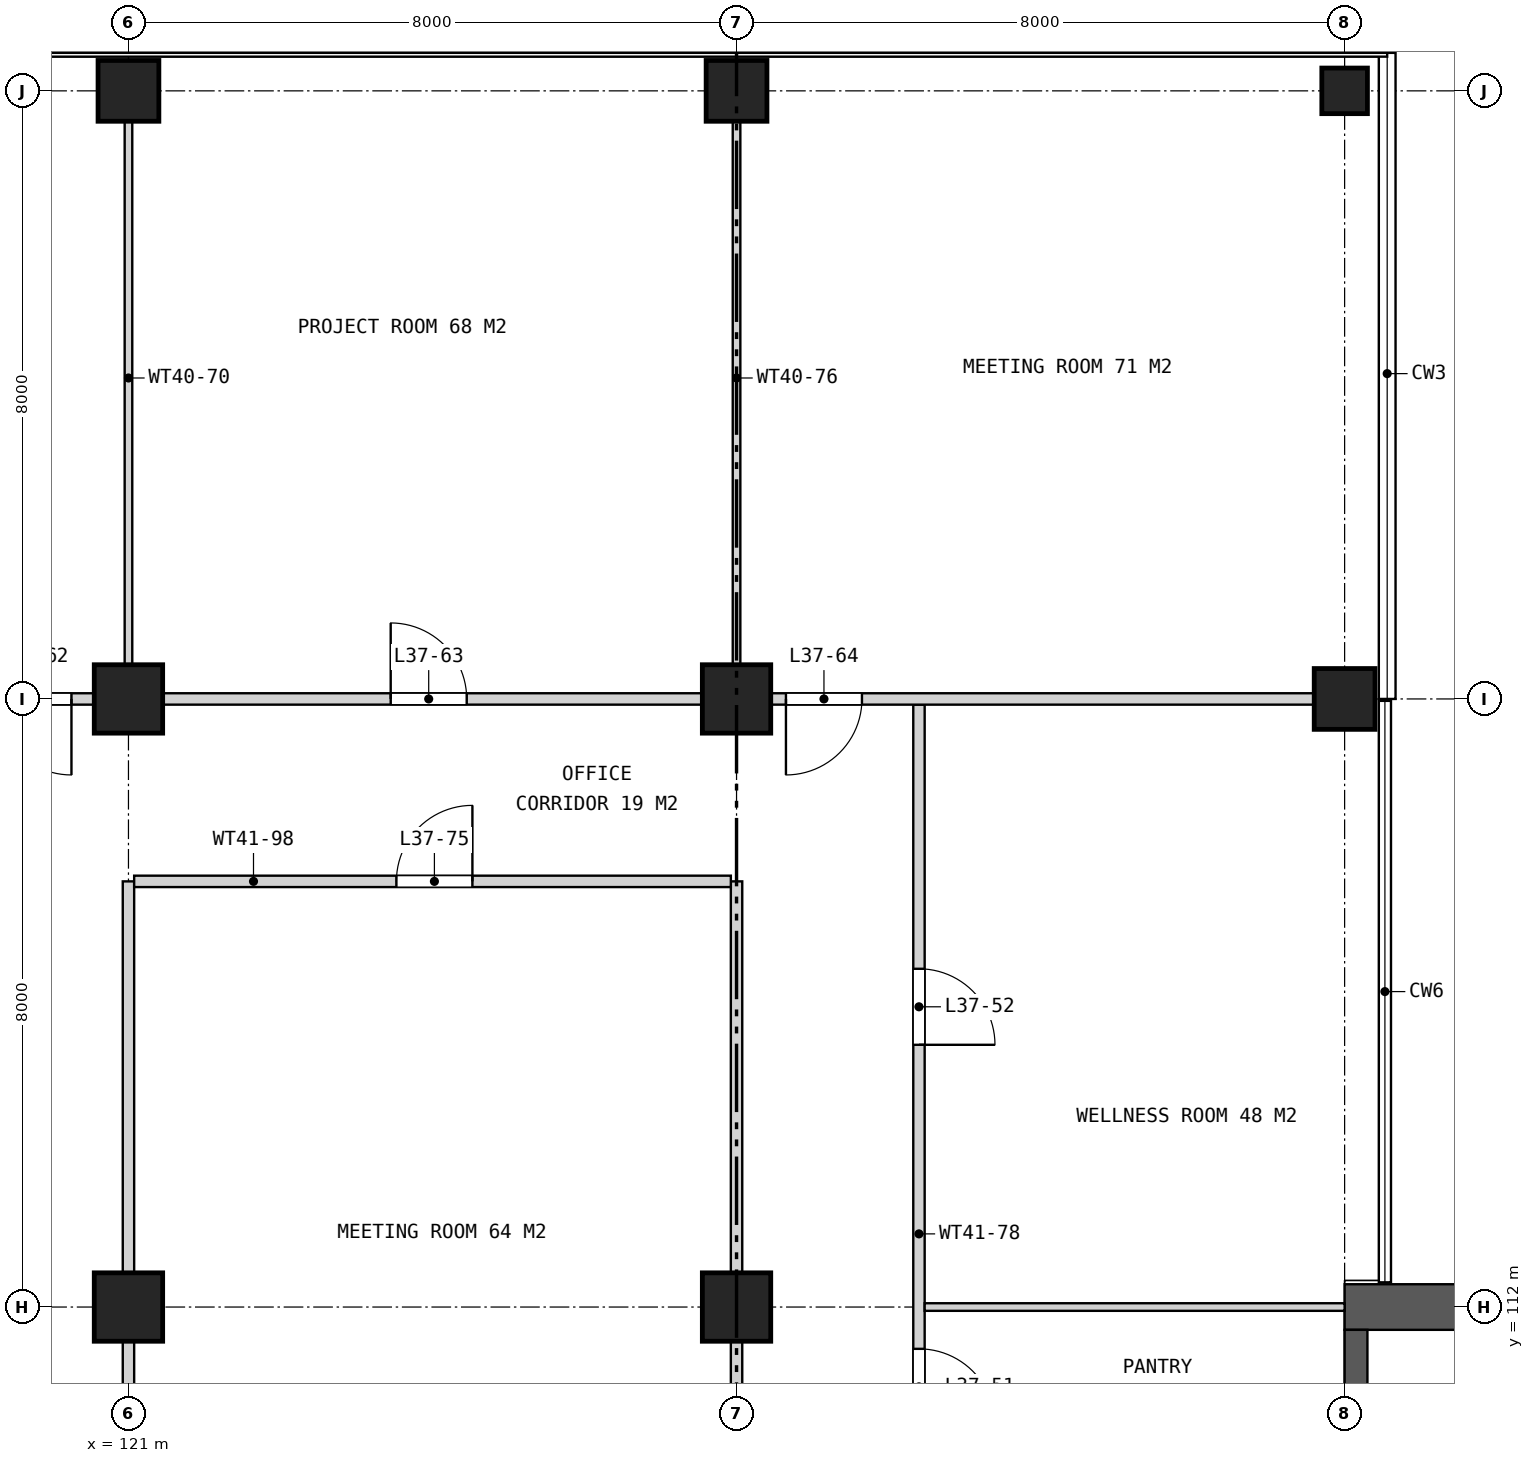
"""IFC4 building model, lengths in metres.
Left out: names, types, materials, properties, quantities, classifications, styles, units other than length and angle.
Written with IfcOpenShell. Run it as: python <this file> out.ifc"""

import sys

from ifc_helpers import new_model, si_unit, direction, frame, frame_2d, origin, origin_2d, place, context, subcontext, project, spatial, rectangle, extrude, element, fill, save


model = new_model("IFC4")
c1 = context("Model", 3, precision=1e-05, world=origin(), true_north=direction((0.0, 1.0)))
c2 = subcontext(c1, "Body", "Model", "MODEL_VIEW")
j1 = project(units=[si_unit("LENGTHUNIT", "METRE"), si_unit("PLANEANGLEUNIT", "RADIAN")], contexts=[c1])
p1 = place(None, origin())
s1 = spatial("IfcSite", under=j1, at=p1, CompositionType="ELEMENT")
p2 = place(p1, origin())
s2 = spatial("IfcBuilding", under=s1, at=p2, CompositionType="ELEMENT")
p3 = place(p2, frame((0.0, 0.0, 178.9)))
s3 = spatial("IfcBuildingStorey", under=s2, at=p3, CompositionType="ELEMENT", Elevation=178.9)
for number, where, z_axis, x_axis in (
    (1, (121.0, 112.0, 0.0), (0.0, 0.0, 1.0), (1.0, 0.0, 0.0)),
    (2, (121.0, 120.0, 0.0), (0.0, 0.0, 1.0), (1.0, 0.0, 0.0)),
):
    element("IfcColumn", number, at=place(p3, frame(where, z_axis=z_axis, x_axis=x_axis)), inside=s3, PredefinedType="COLUMN", context=c2, shape_type="SweptSolid", body=[
        extrude(rectangle(XDim=0.9, YDim=0.9, at=origin_2d()), origin(), (0.0, 0.0, 1.0), 4.2),
    ])
p4 = place(p3, frame((121.0, 128.0, 0.0), z_axis=(0.0, 0.0, 1.0), x_axis=(1.0, 0.0, 0.0)))
e3 = element("IfcColumn", 3, at=p4, inside=s3, PredefinedType="COLUMN", context=c2, shape_type="SweptSolid", body=[
    extrude(rectangle(XDim=0.8, YDim=0.8, at=origin_2d()), origin(), (0.0, 0.0, 1.0), 4.2),
])
for number, where, z_axis, x_axis in (
    (4, (129.0, 112.0, 0.0), (0.0, 0.0, 1.0), (1.0, 0.0, 0.0)),
    (5, (129.0, 120.0, 0.0), (0.0, 0.0, 1.0), (1.0, 0.0, 0.0)),
):
    element("IfcColumn", number, at=place(p3, frame(where, z_axis=z_axis, x_axis=x_axis)), inside=s3, PredefinedType="COLUMN", context=c2, shape_type="SweptSolid", body=[
        extrude(rectangle(XDim=0.9, YDim=0.9, at=origin_2d()), origin(), (0.0, 0.0, 1.0), 4.2),
    ])
for number, where, z_axis, x_axis in (
    (6, (129.0, 128.0, 0.0), (0.0, 0.0, 1.0), (1.0, 0.0, 0.0)),
    (7, (137.0, 120.0, 0.0), (0.0, 0.0, 1.0), (1.0, 0.0, 0.0)),
):
    element("IfcColumn", number, at=place(p3, frame(where, z_axis=z_axis, x_axis=x_axis)), inside=s3, PredefinedType="COLUMN", context=c2, shape_type="SweptSolid", body=[
        extrude(rectangle(XDim=0.8, YDim=0.8, at=origin_2d()), origin(), (0.0, 0.0, 1.0), 4.2),
    ])
p5 = place(p3, frame((137.0, 128.0, 0.0), z_axis=(0.0, 0.0, 1.0), x_axis=(1.0, 0.0, 0.0)))
e8 = element("IfcColumn", 8, at=p5, inside=s3, PredefinedType="COLUMN", context=c2, shape_type="SweptSolid", body=[
    extrude(rectangle(XDim=0.6, YDim=0.6, at=origin_2d()), origin(), (0.0, 0.0, 1.0), 4.2),
])
p6 = place(p3, frame((137.0, 112.0, 0.0), z_axis=(0.0, 0.0, 1.0), x_axis=(1.0, 0.0, 0.0)))
e9 = element("IfcWall", 9, at=p6, inside=s3, PredefinedType="SHEAR", context=c2, shape_type="SweptSolid", body=[
    extrude(rectangle(XDim=7.1, YDim=0.6, at=frame_2d((3.55, 0.0))), origin(), (0.0, 0.0, 1.0), 4.2),
])
p7 = place(p3, frame((137.15, 105.7, 0.0), z_axis=(0.0, 0.0, 1.0), x_axis=(0.0, 1.0, 0.0)))
e10 = element("IfcWall", 10, at=p7, inside=s3, PredefinedType="SHEAR", context=c2, shape_type="SweptSolid", body=[
    extrude(rectangle(XDim=6.0, YDim=0.3, at=frame_2d((3.0, 0.0))), origin(), (0.0, 0.0, 1.0), 4.2),
])
p8 = place(p3, frame((121.0, 82.4, 0.0), z_axis=(0.0, 0.0, 1.0), x_axis=(0.0, 1.0, 0.0)))
e11 = element("IfcWall", 11, at=p8, inside=s3, PredefinedType="PARTITIONING", context=c2, shape_type="SweptSolid", body=[
    extrude(rectangle(XDim=35.2, YDim=0.15, at=frame_2d((17.6, 0.0))), origin(), (0.0, 0.0, 1.0), 3.44),
])
p9 = place(p8, frame((8.25, 0.0, 0.0)))
e12 = element("IfcOpeningElement", 12, at=p9, cuts=e11, PredefinedType="OPENING", context=c2, shape_type="SweptSolid", body=[
    extrude(rectangle(XDim=1.0, YDim=2.1, at=frame_2d((0.5, 1.05))), frame((0.0, 0.085, 0.0), z_axis=(0.0, -1.0, 0.0), x_axis=(1.0, 0.0, 0.0)), (0.0, 0.0, 1.0), 0.17),
])
p10 = place(p8, frame((14.35, 0.0, 0.0)))
e13 = element("IfcOpeningElement", 13, at=p10, cuts=e11, PredefinedType="OPENING", context=c2, shape_type="SweptSolid", body=[
    extrude(rectangle(XDim=1.0, YDim=2.1, at=frame_2d((0.5, 1.05))), frame((0.0, 0.085, 0.0), z_axis=(0.0, -1.0, 0.0), x_axis=(1.0, 0.0, 0.0)), (0.0, 0.0, 1.0), 0.17),
])
p11 = place(p8, frame((18.75, 0.0, 0.0)))
e14 = element("IfcOpeningElement", 14, at=p11, cuts=e11, PredefinedType="OPENING", context=c2, shape_type="SweptSolid", body=[
    extrude(rectangle(XDim=1.0, YDim=2.1, at=frame_2d((0.5, 1.05))), frame((0.0, 0.085, 0.0), z_axis=(0.0, -1.0, 0.0), x_axis=(1.0, 0.0, 0.0)), (0.0, 0.0, 1.0), 0.17),
])
p12 = place(p8, frame((23.45, 0.0, 0.0)))
e15 = element("IfcOpeningElement", 15, at=p12, cuts=e11, PredefinedType="OPENING", context=c2, shape_type="SweptSolid", body=[
    extrude(rectangle(XDim=1.0, YDim=2.1, at=frame_2d((0.5, 1.05))), frame((0.0, 0.085, 0.0), z_axis=(0.0, -1.0, 0.0), x_axis=(1.0, 0.0, 0.0)), (0.0, 0.0, 1.0), 0.17),
])
p13 = place(p3, frame((121.0, 120.075, 0.0), z_axis=(0.0, 0.0, 1.0), x_axis=(0.0, 1.0, 0.0)))
e16 = element("IfcWall", 16, at=p13, inside=s3, PredefinedType="PARTITIONING", context=c2, shape_type="SweptSolid", body=[
    extrude(rectangle(XDim=8.295, YDim=0.1, at=frame_2d((4.147, 0.0))), origin(), (0.0, 0.0, 1.0), 3.44),
])
p14 = place(p3, frame((129.0, 82.4, 0.0), z_axis=(0.0, 0.0, 1.0), x_axis=(0.0, 1.0, 0.0)))
e17 = element("IfcWall", 17, at=p14, inside=s3, PredefinedType="PARTITIONING", context=c2, shape_type="SweptSolid", body=[
    extrude(rectangle(XDim=35.2, YDim=0.15, at=frame_2d((17.6, 0.0))), origin(), (0.0, 0.0, 1.0), 3.44),
])
p15 = place(p14, frame((14.35, 0.0, 0.0)))
e18 = element("IfcOpeningElement", 18, at=p15, cuts=e17, PredefinedType="OPENING", context=c2, shape_type="SweptSolid", body=[
    extrude(rectangle(XDim=1.0, YDim=2.1, at=frame_2d((0.5, 1.05))), frame((0.0, 0.085, 0.0), z_axis=(0.0, -1.0, 0.0), x_axis=(1.0, 0.0, 0.0)), (0.0, 0.0, 1.0), 0.17),
])
p16 = place(p14, frame((23.45, 0.0, 0.0)))
e19 = element("IfcOpeningElement", 19, at=p16, cuts=e17, PredefinedType="OPENING", context=c2, shape_type="SweptSolid", body=[
    extrude(rectangle(XDim=1.0, YDim=2.1, at=frame_2d((0.5, 1.05))), frame((0.0, 0.085, 0.0), z_axis=(0.0, -1.0, 0.0), x_axis=(1.0, 0.0, 0.0)), (0.0, 0.0, 1.0), 0.17),
])
p17 = place(p3, frame((129.0, 120.075, 0.0), z_axis=(0.0, 0.0, 1.0), x_axis=(0.0, 1.0, 0.0)))
e20 = element("IfcWall", 20, at=p17, inside=s3, PredefinedType="PARTITIONING", context=c2, shape_type="SweptSolid", body=[
    extrude(rectangle(XDim=8.295, YDim=0.1, at=frame_2d((4.147, 0.0))), origin(), (0.0, 0.0, 1.0), 3.44),
])
p18 = place(p3, frame((131.4, 106.0, 0.0), z_axis=(0.0, 0.0, 1.0), x_axis=(0.0, 1.0, 0.0)))
e21 = element("IfcWall", 21, at=p18, inside=s3, PredefinedType="PARTITIONING", context=c2, shape_type="SweptSolid", body=[
    extrude(rectangle(XDim=13.925, YDim=0.15, at=frame_2d((6.962, 0.0))), origin(), (0.0, 0.0, 1.0), 3.44),
])
p19 = place(p18, frame((1.45, 0.0, 0.0)))
e22 = element("IfcOpeningElement", 22, at=p19, cuts=e21, PredefinedType="OPENING", context=c2, shape_type="SweptSolid", body=[
    extrude(rectangle(XDim=1.0, YDim=2.1, at=frame_2d((0.5, 1.05))), frame((0.0, 0.085, 0.0), z_axis=(0.0, -1.0, 0.0), x_axis=(1.0, 0.0, 0.0)), (0.0, 0.0, 1.0), 0.17),
])
p20 = place(p18, frame((4.45, 0.0, 0.0)))
e23 = element("IfcOpeningElement", 23, at=p20, cuts=e21, PredefinedType="OPENING", context=c2, shape_type="SweptSolid", body=[
    extrude(rectangle(XDim=1.0, YDim=2.1, at=frame_2d((0.5, 1.05))), frame((0.0, 0.085, 0.0), z_axis=(0.0, -1.0, 0.0), x_axis=(1.0, 0.0, 0.0)), (0.0, 0.0, 1.0), 0.17),
])
p21 = place(p18, frame((9.45, 0.0, 0.0)))
e24 = element("IfcOpeningElement", 24, at=p21, cuts=e21, PredefinedType="OPENING", context=c2, shape_type="SweptSolid", body=[
    extrude(rectangle(XDim=1.0, YDim=2.1, at=frame_2d((0.5, 1.05))), frame((0.0, 0.085, 0.0), z_axis=(0.0, -1.0, 0.0), x_axis=(1.0, 0.0, 0.0)), (0.0, 0.0, 1.0), 0.17),
])
p22 = place(p3, frame((131.475, 112.0, 0.0), z_axis=(0.0, 0.0, 1.0), x_axis=(1.0, 0.0, 0.0)))
e25 = element("IfcWall", 25, at=p22, inside=s3, PredefinedType="PARTITIONING", context=c2, shape_type="SweptSolid", body=[
    extrude(rectangle(XDim=5.525, YDim=0.1, at=frame_2d((2.762, 0.0))), origin(), (0.0, 0.0, 1.0), 3.44),
])
p23 = place(p3, frame((121.075, 117.6, 0.0), z_axis=(0.0, 0.0, 1.0), x_axis=(1.0, 0.0, 0.0)))
e26 = element("IfcWall", 26, at=p23, inside=s3, PredefinedType="PARTITIONING", context=c2, shape_type="SweptSolid", body=[
    extrude(rectangle(XDim=7.85, YDim=0.15, at=frame_2d((3.925, 0.0))), origin(), (0.0, 0.0, 1.0), 3.44),
])
p24 = place(p23, frame((3.45, 0.0, 0.0)))
e27 = element("IfcOpeningElement", 27, at=p24, cuts=e26, PredefinedType="OPENING", context=c2, shape_type="SweptSolid", body=[
    extrude(rectangle(XDim=1.0, YDim=2.1, at=frame_2d((0.5, 1.05))), frame((0.0, 0.085, 0.0), z_axis=(0.0, -1.0, 0.0), x_axis=(1.0, 0.0, 0.0)), (0.0, 0.0, 1.0), 0.17),
])
p25 = place(p3, frame((112.63, 120.0, 0.0), z_axis=(0.0, 0.0, 1.0), x_axis=(1.0, 0.0, 0.0)))
e28 = element("IfcWall", 28, at=p25, inside=s3, PredefinedType="PARTITIONING", context=c2, shape_type="SweptSolid", body=[
    extrude(rectangle(XDim=24.74, YDim=0.15, at=frame_2d((12.37, 0.0))), origin(), (0.0, 0.0, 1.0), 3.44),
])
p26 = place(p25, frame((6.62, 0.0, 0.0)))
e29 = element("IfcOpeningElement", 29, at=p26, cuts=e28, PredefinedType="OPENING", context=c2, shape_type="SweptSolid", body=[
    extrude(rectangle(XDim=1.0, YDim=2.1, at=frame_2d((0.5, 1.05))), frame((0.0, 0.085, 0.0), z_axis=(0.0, -1.0, 0.0), x_axis=(1.0, 0.0, 0.0)), (0.0, 0.0, 1.0), 0.17),
])
p27 = place(p25, frame((11.82, 0.0, 0.0)))
e30 = element("IfcOpeningElement", 30, at=p27, cuts=e28, PredefinedType="OPENING", context=c2, shape_type="SweptSolid", body=[
    extrude(rectangle(XDim=1.0, YDim=2.1, at=frame_2d((0.5, 1.05))), frame((0.0, 0.085, 0.0), z_axis=(0.0, -1.0, 0.0), x_axis=(1.0, 0.0, 0.0)), (0.0, 0.0, 1.0), 0.17),
])
p28 = place(p25, frame((17.02, 0.0, 0.0)))
e31 = element("IfcOpeningElement", 31, at=p28, cuts=e28, PredefinedType="OPENING", context=c2, shape_type="SweptSolid", body=[
    extrude(rectangle(XDim=1.0, YDim=2.1, at=frame_2d((0.5, 1.05))), frame((0.0, 0.085, 0.0), z_axis=(0.0, -1.0, 0.0), x_axis=(1.0, 0.0, 0.0)), (0.0, 0.0, 1.0), 0.17),
])
p29 = place(p20, frame((1.0, 0.0, 0.0), z_axis=(0.0, 0.0, 1.0), x_axis=(-1.0, 0.0, 0.0)))
e32 = element("IfcDoor", 32, at=p29, inside=s3, OperationType="SINGLE_SWING_RIGHT", PredefinedType="DOOR", context=c2, shape_type="SweptSolid", body=[
    extrude(rectangle(XDim=1.0, YDim=2.1, at=frame_2d((0.5, 1.05))), frame((0.0, 0.025, 0.0), z_axis=(0.0, -1.0, 0.0), x_axis=(1.0, 0.0, 0.0)), (0.0, 0.0, 1.0), 0.05),
])
fill(e23, e32)
p30 = place(p21, frame((1.0, 0.0, 0.0), z_axis=(0.0, 0.0, 1.0), x_axis=(-1.0, 0.0, 0.0)))
e33 = element("IfcDoor", 33, at=p30, inside=s3, OperationType="SINGLE_SWING_RIGHT", PredefinedType="DOOR", context=c2, shape_type="SweptSolid", body=[
    extrude(rectangle(XDim=1.0, YDim=2.1, at=frame_2d((0.5, 1.05))), frame((0.0, 0.025, 0.0), z_axis=(0.0, -1.0, 0.0), x_axis=(1.0, 0.0, 0.0)), (0.0, 0.0, 1.0), 0.05),
])
fill(e24, e33)
p31 = place(p26, frame((1.0, 0.0, 0.0), z_axis=(0.0, 0.0, 1.0), x_axis=(-1.0, 0.0, 0.0)))
e34 = element("IfcDoor", 34, at=p31, inside=s3, OperationType="SINGLE_SWING_LEFT", PredefinedType="DOOR", context=c2, shape_type="SweptSolid", body=[
    extrude(rectangle(XDim=1.0, YDim=2.1, at=frame_2d((0.5, 1.05))), frame((0.0, 0.025, 0.0), z_axis=(0.0, -1.0, 0.0), x_axis=(1.0, 0.0, 0.0)), (0.0, 0.0, 1.0), 0.05),
])
fill(e29, e34)
p32 = place(p27, origin())
e35 = element("IfcDoor", 35, at=p32, inside=s3, OperationType="SINGLE_SWING_LEFT", PredefinedType="DOOR", context=c2, shape_type="SweptSolid", body=[
    extrude(rectangle(XDim=1.0, YDim=2.1, at=frame_2d((0.5, 1.05))), frame((0.0, 0.025, 0.0), z_axis=(0.0, -1.0, 0.0), x_axis=(1.0, 0.0, 0.0)), (0.0, 0.0, 1.0), 0.05),
])
fill(e30, e35)
p33 = place(p28, frame((1.0, 0.0, 0.0), z_axis=(0.0, 0.0, 1.0), x_axis=(-1.0, 0.0, 0.0)))
e36 = element("IfcDoor", 36, at=p33, inside=s3, OperationType="SINGLE_SWING_RIGHT", PredefinedType="DOOR", context=c2, shape_type="SweptSolid", body=[
    extrude(rectangle(XDim=1.0, YDim=2.1, at=frame_2d((0.5, 1.05))), frame((0.0, 0.025, 0.0), z_axis=(0.0, -1.0, 0.0), x_axis=(1.0, 0.0, 0.0)), (0.0, 0.0, 1.0), 0.05),
])
fill(e31, e36)
p34 = place(p24, origin())
e37 = element("IfcDoor", 37, at=p34, inside=s3, OperationType="SINGLE_SWING_RIGHT", PredefinedType="DOOR", context=c2, shape_type="SweptSolid", body=[
    extrude(rectangle(XDim=1.0, YDim=2.1, at=frame_2d((0.5, 1.05))), frame((0.0, 0.025, 0.0), z_axis=(0.0, -1.0, 0.0), x_axis=(1.0, 0.0, 0.0)), (0.0, 0.0, 1.0), 0.05),
])
fill(e27, e37)
save(model, sys.argv[1])
